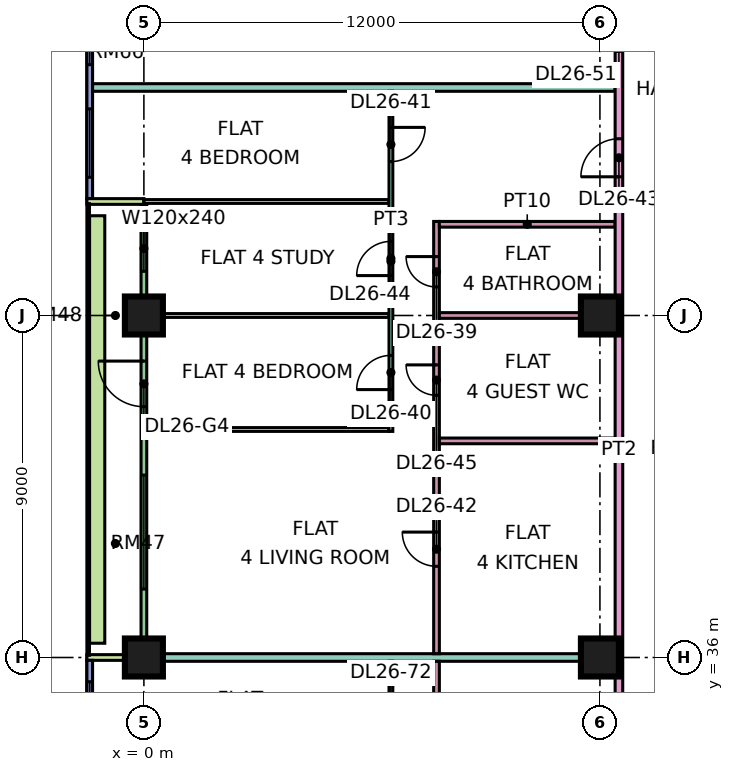
"""IFC4 building model, lengths in metres.
Left out: names, types, materials, properties, quantities, classifications, styles, units other than length and angle.
Written with IfcOpenShell. Run it as: python <this file> out.ifc"""

import sys

from ifc_helpers import new_model, si_unit, direction, frame, frame_2d, origin, origin_2d, place, context, subcontext, project, spatial, rectangle, extrude, element, fill, save


model = new_model("IFC4")
c1 = context("Model", 3, precision=1e-05, world=origin(), true_north=direction((0.0, 1.0)))
c2 = subcontext(c1, "Body", "Model", "MODEL_VIEW")
j1 = project(units=[si_unit("LENGTHUNIT", "METRE"), si_unit("PLANEANGLEUNIT", "RADIAN")], contexts=[c1])
p1 = place(None, origin())
s1 = spatial("IfcSite", under=j1, at=p1, CompositionType="ELEMENT")
p2 = place(p1, origin())
s2 = spatial("IfcBuilding", under=s1, at=p2, CompositionType="ELEMENT")
p3 = place(p2, frame((0.0, 0.0, 114.4)))
s3 = spatial("IfcBuildingStorey", under=s2, at=p3, CompositionType="ELEMENT", Elevation=114.4)
p4 = place(p3, frame((0.0, 36.0, 0.0), z_axis=(0.0, 0.0, 1.0), x_axis=(1.0, 0.0, 0.0)))
e1 = element("IfcColumn", 1, at=p4, inside=s3, PredefinedType="COLUMN", context=c2, shape_type="SweptSolid", body=[
    extrude(rectangle(XDim=1.0, YDim=1.0, at=origin_2d()), origin(), (0.0, 0.0, 1.0), 3.75),
])
for number, where, z_axis, x_axis in (
    (2, (0.0, 45.0, 0.0), (0.0, 0.0, 1.0), (1.0, 0.0, 0.0)),
    (3, (12.0, 36.0, 0.0), (0.0, 0.0, 1.0), (1.0, 0.0, 0.0)),
    (4, (12.0, 45.0, 0.0), (0.0, 0.0, 1.0), (1.0, 0.0, 0.0)),
):
    element("IfcColumn", number, at=place(p3, frame(where, z_axis=z_axis, x_axis=x_axis)), inside=s3, PredefinedType="COLUMN", context=c2, shape_type="SweptSolid", body=[
        extrude(rectangle(XDim=1.0, YDim=1.0, at=origin_2d()), origin(), (0.0, 0.0, 1.0), 3.75),
    ])
p5 = place(p3, frame((-1.425, 61.5, 0.0), z_axis=(0.0, 0.0, 1.0), x_axis=(0.0, -1.0, 0.0)))
e5 = element("IfcWall", 5, at=p5, inside=s3, PredefinedType="SOLIDWALL", context=c2, shape_type="SweptSolid", body=[
    extrude(rectangle(XDim=13.425, YDim=0.15, at=frame_2d((6.712, 0.0))), origin(), (0.0, 0.0, 1.0), 3.35),
])
p6 = place(p5, frame((0.75, 0.0, 0.45)))
e6 = element("IfcOpeningElement", 6, at=p6, cuts=e5, PredefinedType="OPENING", context=c2, shape_type="SweptSolid", body=[
    extrude(rectangle(XDim=3.0, YDim=2.4, at=frame_2d((1.5, 1.2))), frame((0.0, 0.085, 0.0), z_axis=(0.0, -1.0, 0.0), x_axis=(1.0, 0.0, 0.0)), (0.0, 0.0, 1.0), 0.17),
])
p7 = place(p5, frame((5.1, 0.0, 0.45)))
e7 = element("IfcOpeningElement", 7, at=p7, cuts=e5, PredefinedType="OPENING", context=c2, shape_type="SweptSolid", body=[
    extrude(rectangle(XDim=4.8, YDim=2.4, at=frame_2d((2.4, 1.2))), frame((0.0, 0.085, 0.0), z_axis=(0.0, -1.0, 0.0), x_axis=(1.0, 0.0, 0.0)), (0.0, 0.0, 1.0), 0.17),
])
p8 = place(p5, frame((11.062, 0.0, 0.45)))
e8 = element("IfcOpeningElement", 8, at=p8, cuts=e5, PredefinedType="OPENING", context=c2, shape_type="SweptSolid", body=[
    extrude(rectangle(XDim=1.8, YDim=2.4, at=frame_2d((0.9, 1.2))), frame((0.0, 0.085, 0.0), z_axis=(0.0, -1.0, 0.0), x_axis=(1.0, 0.0, 0.0)), (0.0, 0.0, 1.0), 0.17),
])
p9 = place(p3, frame((0.0, 47.925, 0.0), z_axis=(0.0, 0.0, 1.0), x_axis=(0.0, -1.0, 0.0)))
e9 = element("IfcWall", 9, at=p9, inside=s3, PredefinedType="SOLIDWALL", context=c2, shape_type="SweptSolid", body=[
    extrude(rectangle(XDim=11.85, YDim=0.15, at=frame_2d((5.925, 0.0))), origin(), (0.0, 0.0, 1.0), 3.35),
])
p10 = place(p9, frame((0.562, 0.0, 0.45)))
e10 = element("IfcOpeningElement", 10, at=p10, cuts=e9, PredefinedType="OPENING", context=c2, shape_type="SweptSolid", body=[
    extrude(rectangle(XDim=1.2, YDim=2.4, at=frame_2d((0.6, 1.2))), frame((0.0, 0.085, 0.0), z_axis=(0.0, -1.0, 0.0), x_axis=(1.0, 0.0, 0.0)), (0.0, 0.0, 1.0), 0.17),
])
p11 = place(p9, frame((4.125, 0.0, 0.0)))
e11 = element("IfcOpeningElement", 11, at=p11, cuts=e9, PredefinedType="OPENING", context=c2, shape_type="SweptSolid", body=[
    extrude(rectangle(XDim=1.2, YDim=2.4, at=frame_2d((0.6, 1.2))), frame((0.0, 0.085, 0.0), z_axis=(0.0, -1.0, 0.0), x_axis=(1.0, 0.0, 0.0)), (0.0, 0.0, 1.0), 0.17),
])
p12 = place(p9, frame((7.125, 0.0, 0.45)))
e12 = element("IfcOpeningElement", 12, at=p12, cuts=e9, PredefinedType="OPENING", context=c2, shape_type="SweptSolid", body=[
    extrude(rectangle(XDim=3.0, YDim=2.4, at=frame_2d((1.5, 1.2))), frame((0.0, 0.085, 0.0), z_axis=(0.0, -1.0, 0.0), x_axis=(1.0, 0.0, 0.0)), (0.0, 0.0, 1.0), 0.17),
])
for number, where, z_axis, x_axis in (
    (13, (-1.5, 48.0, 0.0), (0.0, 0.0, 1.0), (1.0, 0.0, 0.0)),
    (14, (-1.5, 36.0, 0.0), (0.0, 0.0, 1.0), (1.0, 0.0, 0.0)),
):
    element("IfcWall", number, at=place(p3, frame(where, z_axis=z_axis, x_axis=x_axis)), inside=s3, PredefinedType="SOLIDWALL", context=c2, shape_type="SweptSolid", body=[
        extrude(rectangle(XDim=1.5, YDim=0.15, at=frame_2d((0.75, 0.0))), origin(), (0.0, 0.0, 1.0), 3.35),
    ])
p13 = place(p3, frame((-1.425, 35.925, 0.0), z_axis=(0.0, 0.0, 1.0), x_axis=(0.0, -1.0, 0.0)))
e15 = element("IfcWall", 15, at=p13, inside=s3, PredefinedType="SOLIDWALL", context=c2, shape_type="SweptSolid", body=[
    extrude(rectangle(XDim=11.85, YDim=0.15, at=frame_2d((5.925, 0.0))), origin(), (0.0, 0.0, 1.0), 3.35),
])
p14 = place(p13, frame((0.562, 0.0, 0.45)))
e16 = element("IfcOpeningElement", 16, at=p14, cuts=e15, PredefinedType="OPENING", context=c2, shape_type="SweptSolid", body=[
    extrude(rectangle(XDim=1.8, YDim=2.4, at=frame_2d((0.9, 1.2))), frame((0.0, 0.085, 0.0), z_axis=(0.0, -1.0, 0.0), x_axis=(1.0, 0.0, 0.0)), (0.0, 0.0, 1.0), 0.17),
])
p15 = place(p13, frame((3.525, 0.0, 0.45)))
e17 = element("IfcOpeningElement", 17, at=p15, cuts=e15, PredefinedType="OPENING", context=c2, shape_type="SweptSolid", body=[
    extrude(rectangle(XDim=1.8, YDim=2.4, at=frame_2d((0.9, 1.2))), frame((0.0, 0.085, 0.0), z_axis=(0.0, -1.0, 0.0), x_axis=(1.0, 0.0, 0.0)), (0.0, 0.0, 1.0), 0.17),
])
p16 = place(p13, frame((7.387, 0.0, 0.45)))
e18 = element("IfcOpeningElement", 18, at=p16, cuts=e15, PredefinedType="OPENING", context=c2, shape_type="SweptSolid", body=[
    extrude(rectangle(XDim=3.0, YDim=2.4, at=frame_2d((1.5, 1.2))), frame((0.0, 0.085, 0.0), z_axis=(0.0, -1.0, 0.0), x_axis=(1.0, 0.0, 0.0)), (0.0, 0.0, 1.0), 0.17),
])
p17 = place(p3, frame((-1.229, 47.625, 0.0), z_axis=(0.0, 0.0, 1.0), x_axis=(0.0, -1.0, 0.0)))
e19 = element("IfcWall", 19, at=p17, inside=s3, PredefinedType="SOLIDWALL", context=c2, shape_type="SweptSolid", body=[
    extrude(rectangle(XDim=11.25, YDim=0.4, at=frame_2d((5.625, 0.0))), origin(), (0.0, 0.0, 1.0), 0.7),
])
e20 = element("IfcWall", 20, at=p4, inside=s3, PredefinedType="PARTITIONING", context=c2, shape_type="SweptSolid", body=[
    extrude(rectangle(XDim=12.4, YDim=0.2, at=frame_2d((6.2, 0.0))), origin(), (0.0, 0.0, 1.0), 3.35),
])
p18 = place(p3, frame((0.0, 48.0, 0.0), z_axis=(0.0, 0.0, 1.0), x_axis=(1.0, 0.0, 0.0)))
e21 = element("IfcWall", 21, at=p18, inside=s3, PredefinedType="PARTITIONING", context=c2, shape_type="SweptSolid", body=[
    extrude(rectangle(XDim=6.45, YDim=0.1, at=frame_2d((3.225, 0.0))), origin(), (0.0, 0.0, 1.0), 3.35),
])
p19 = place(p3, frame((-1.35, 51.0, 0.0), z_axis=(0.0, 0.0, 1.0), x_axis=(1.0, 0.0, 0.0)))
e22 = element("IfcWall", 22, at=p19, inside=s3, PredefinedType="PARTITIONING", context=c2, shape_type="SweptSolid", body=[
    extrude(rectangle(XDim=13.75, YDim=0.2, at=frame_2d((6.875, 0.0))), origin(), (0.0, 0.0, 1.0), 3.35),
])
for number, where, z_axis, x_axis in (
    (23, (0.074, 42.0, 0.0), (0.0, 0.0, 1.0), (1.0, 0.0, 0.0)),
    (24, (0.074, 45.0, 0.0), (0.0, 0.0, 1.0), (1.0, 0.0, 0.0)),
):
    element("IfcWall", number, at=place(p3, frame(where, z_axis=z_axis, x_axis=x_axis)), inside=s3, PredefinedType="PARTITIONING", context=c2, shape_type="SweptSolid", body=[
        extrude(rectangle(XDim=6.376, YDim=0.1, at=frame_2d((3.188, 0.0))), origin(), (0.0, 0.0, 1.0), 3.35),
    ])
p20 = place(p3, frame((6.5, 30.05, 0.0), z_axis=(0.0, 0.0, 1.0), x_axis=(0.0, 1.0, 0.0)))
e25 = element("IfcWall", 25, at=p20, inside=s3, PredefinedType="PARTITIONING", context=c2, shape_type="SweptSolid", body=[
    extrude(rectangle(XDim=5.85, YDim=0.1, at=frame_2d((2.925, 0.0))), origin(), (0.0, 0.0, 1.0), 3.35),
])
p21 = place(p20, frame((1.0, 0.0, 0.0)))
e26 = element("IfcOpeningElement", 26, at=p21, cuts=e25, PredefinedType="OPENING", context=c2, shape_type="SweptSolid", body=[
    extrude(rectangle(XDim=0.9, YDim=2.1, at=frame_2d((0.45, 1.05))), frame((0.0, 0.06, 0.0), z_axis=(0.0, -1.0, 0.0), x_axis=(1.0, 0.0, 0.0)), (0.0, 0.0, 1.0), 0.12),
])
p22 = place(p20, frame((4.0, 0.0, 0.0)))
e27 = element("IfcOpeningElement", 27, at=p22, cuts=e25, PredefinedType="OPENING", context=c2, shape_type="SweptSolid", body=[
    extrude(rectangle(XDim=0.9, YDim=2.1, at=frame_2d((0.45, 1.05))), frame((0.0, 0.06, 0.0), z_axis=(0.0, -1.0, 0.0), x_axis=(1.0, 0.0, 0.0)), (0.0, 0.0, 1.0), 0.12),
])
p23 = place(p3, frame((6.5, 41.95, 0.0), z_axis=(0.0, 0.0, 1.0), x_axis=(0.0, 1.0, 0.0)))
e28 = element("IfcWall", 28, at=p23, inside=s3, PredefinedType="PARTITIONING", context=c2, shape_type="SweptSolid", body=[
    extrude(rectangle(XDim=8.95, YDim=0.1, at=frame_2d((4.475, 0.0))), origin(), (0.0, 0.0, 1.0), 3.35),
])
p24 = place(p23, frame((1.1, 0.0, 0.0)))
e29 = element("IfcOpeningElement", 29, at=p24, cuts=e28, PredefinedType="OPENING", context=c2, shape_type="SweptSolid", body=[
    extrude(rectangle(XDim=0.9, YDim=2.1, at=frame_2d((0.45, 1.05))), frame((0.0, 0.06, 0.0), z_axis=(0.0, -1.0, 0.0), x_axis=(1.0, 0.0, 0.0)), (0.0, 0.0, 1.0), 0.12),
])
p25 = place(p23, frame((7.1, 0.0, 0.0)))
e30 = element("IfcOpeningElement", 30, at=p25, cuts=e28, PredefinedType="OPENING", context=c2, shape_type="SweptSolid", body=[
    extrude(rectangle(XDim=0.9, YDim=2.1, at=frame_2d((0.45, 1.05))), frame((0.0, 0.06, 0.0), z_axis=(0.0, -1.0, 0.0), x_axis=(1.0, 0.0, 0.0)), (0.0, 0.0, 1.0), 0.12),
])
p26 = place(p23, frame((4.1, 0.0, 0.0)))
e31 = element("IfcOpeningElement", 31, at=p26, cuts=e28, PredefinedType="OPENING", context=c2, shape_type="SweptSolid", body=[
    extrude(rectangle(XDim=0.9, YDim=2.1, at=frame_2d((0.45, 1.05))), frame((0.0, 0.06, 0.0), z_axis=(0.0, -1.0, 0.0), x_axis=(1.0, 0.0, 0.0)), (0.0, 0.0, 1.0), 0.12),
])
p27 = place(p3, frame((7.7, 26.625, 0.0), z_axis=(0.0, 0.0, 1.0), x_axis=(0.0, 1.0, 0.0)))
e32 = element("IfcWall", 32, at=p27, inside=s3, PredefinedType="PARTITIONING", context=c2, shape_type="SweptSolid", body=[
    extrude(rectangle(XDim=9.275, YDim=0.15, at=frame_2d((4.637, 0.0))), origin(), (0.0, 0.0, 1.0), 3.35),
])
p28 = place(p27, frame((1.275, 0.0, 0.0)))
e33 = element("IfcOpeningElement", 33, at=p28, cuts=e32, PredefinedType="OPENING", context=c2, shape_type="SweptSolid", body=[
    extrude(rectangle(XDim=0.8, YDim=2.1, at=frame_2d((0.4, 1.05))), frame((0.0, 0.085, 0.0), z_axis=(0.0, -1.0, 0.0), x_axis=(1.0, 0.0, 0.0)), (0.0, 0.0, 1.0), 0.17),
])
p29 = place(p27, frame((5.925, 0.0, 0.0)))
e34 = element("IfcOpeningElement", 34, at=p29, cuts=e32, PredefinedType="OPENING", context=c2, shape_type="SweptSolid", body=[
    extrude(rectangle(XDim=0.9, YDim=2.1, at=frame_2d((0.45, 1.05))), frame((0.0, 0.085, 0.0), z_axis=(0.0, -1.0, 0.0), x_axis=(1.0, 0.0, 0.0)), (0.0, 0.0, 1.0), 0.17),
])
p30 = place(p3, frame((7.7, 36.1, 0.0), z_axis=(0.0, 0.0, 1.0), x_axis=(0.0, 1.0, 0.0)))
e35 = element("IfcWall", 35, at=p30, inside=s3, PredefinedType="PARTITIONING", context=c2, shape_type="SweptSolid", body=[
    extrude(rectangle(XDim=11.375, YDim=0.15, at=frame_2d((5.688, 0.0))), origin(), (0.0, 0.0, 1.0), 3.35),
])
p31 = place(p30, frame((9.65, 0.0, 0.0)))
e36 = element("IfcOpeningElement", 36, at=p31, cuts=e35, PredefinedType="OPENING", context=c2, shape_type="SweptSolid", body=[
    extrude(rectangle(XDim=0.8, YDim=2.1, at=frame_2d((0.4, 1.05))), frame((0.0, 0.085, 0.0), z_axis=(0.0, -1.0, 0.0), x_axis=(1.0, 0.0, 0.0)), (0.0, 0.0, 1.0), 0.17),
])
p32 = place(p30, frame((2.3, 0.0, 0.0)))
e37 = element("IfcOpeningElement", 37, at=p32, cuts=e35, PredefinedType="OPENING", context=c2, shape_type="SweptSolid", body=[
    extrude(rectangle(XDim=0.9, YDim=2.1, at=frame_2d((0.45, 1.05))), frame((0.0, 0.085, 0.0), z_axis=(0.0, -1.0, 0.0), x_axis=(1.0, 0.0, 0.0)), (0.0, 0.0, 1.0), 0.17),
])
p33 = place(p30, frame((6.8, 0.0, 0.0)))
e38 = element("IfcOpeningElement", 38, at=p33, cuts=e35, PredefinedType="OPENING", context=c2, shape_type="SweptSolid", body=[
    extrude(rectangle(XDim=0.8, YDim=2.1, at=frame_2d((0.4, 1.05))), frame((0.0, 0.085, 0.0), z_axis=(0.0, -1.0, 0.0), x_axis=(1.0, 0.0, 0.0)), (0.0, 0.0, 1.0), 0.17),
])
for number, where, z_axis, x_axis in (
    (39, (7.775, 41.7, 0.0), (0.0, 0.0, 1.0), (1.0, 0.0, 0.0)),
    (40, (7.775, 45.0, 0.0), (0.0, 0.0, 1.0), (1.0, 0.0, 0.0)),
    (41, (7.775, 47.4, 0.0), (0.0, 0.0, 1.0), (1.0, 0.0, 0.0)),
):
    element("IfcWall", number, at=place(p3, frame(where, z_axis=z_axis, x_axis=x_axis)), inside=s3, PredefinedType="PARTITIONING", context=c2, shape_type="SweptSolid", body=[
        extrude(rectangle(XDim=4.625, YDim=0.15, at=frame_2d((2.312, 0.0))), origin(), (0.0, 0.0, 1.0), 3.35),
    ])
p34 = place(p3, frame((12.5, 20.0, 0.0), z_axis=(0.0, 0.0, 1.0), x_axis=(0.0, 1.0, 0.0)))
e42 = element("IfcWall", 42, at=p34, inside=s3, PredefinedType="PARTITIONING", context=c2, shape_type="SweptSolid", body=[
    extrude(rectangle(XDim=42.926, YDim=0.2, at=frame_2d((21.463, 0.0))), origin(), (0.0, 0.0, 1.0), 3.35),
])
p35 = place(p34, frame((28.65, 0.0, 0.0)))
e43 = element("IfcOpeningElement", 43, at=p35, cuts=e42, PredefinedType="OPENING", context=c2, shape_type="SweptSolid", body=[
    extrude(rectangle(XDim=1.0, YDim=2.1, at=frame_2d((0.5, 1.05))), frame((0.0, 0.11, 0.0), z_axis=(0.0, -1.0, 0.0), x_axis=(1.0, 0.0, 0.0)), (0.0, 0.0, 1.0), 0.22),
])
p36 = place(p34, frame((31.95, 0.0, 0.0)))
e44 = element("IfcOpeningElement", 44, at=p36, cuts=e42, PredefinedType="OPENING", context=c2, shape_type="SweptSolid", body=[
    extrude(rectangle(XDim=1.0, YDim=2.1, at=frame_2d((0.5, 1.05))), frame((0.0, 0.11, 0.0), z_axis=(0.0, -1.0, 0.0), x_axis=(1.0, 0.0, 0.0)), (0.0, 0.0, 1.0), 0.22),
])
p37 = place(p34, frame((0.6, 0.0, 0.0)))
e45 = element("IfcOpeningElement", 45, at=p37, cuts=e42, PredefinedType="OPENING", context=c2, shape_type="SweptSolid", body=[
    extrude(rectangle(XDim=1.2, YDim=2.1, at=frame_2d((0.6, 1.05))), frame((0.0, 0.11, 0.0), z_axis=(0.0, -1.0, 0.0), x_axis=(1.0, 0.0, 0.0)), (0.0, 0.0, 1.0), 0.22),
])
p38 = place(p34, frame((4.65, 0.0, 0.0)))
e46 = element("IfcOpeningElement", 46, at=p38, cuts=e42, PredefinedType="OPENING", context=c2, shape_type="SweptSolid", body=[
    extrude(rectangle(XDim=1.0, YDim=2.1, at=frame_2d((0.5, 1.05))), frame((0.0, 0.11, 0.0), z_axis=(0.0, -1.0, 0.0), x_axis=(1.0, 0.0, 0.0)), (0.0, 0.0, 1.0), 0.22),
])
p39 = place(p7, origin())
e47 = element("IfcWindow", 47, at=p39, inside=s3, PartitioningType="SINGLE_PANEL", PredefinedType="WINDOW", context=c2, shape_type="SweptSolid", body=[
    extrude(rectangle(XDim=4.8, YDim=2.4, at=frame_2d((2.4, 1.2))), frame((0.0, 0.03, 0.0), z_axis=(0.0, -1.0, 0.0), x_axis=(1.0, 0.0, 0.0)), (0.0, 0.0, 1.0), 0.06),
])
fill(e7, e47)
p40 = place(p8, origin())
e48 = element("IfcWindow", 48, at=p40, inside=s3, PartitioningType="SINGLE_PANEL", PredefinedType="WINDOW", context=c2, shape_type="SweptSolid", body=[
    extrude(rectangle(XDim=1.8, YDim=2.4, at=frame_2d((0.9, 1.2))), frame((0.0, 0.03, 0.0), z_axis=(0.0, -1.0, 0.0), x_axis=(1.0, 0.0, 0.0)), (0.0, 0.0, 1.0), 0.06),
])
fill(e8, e48)
p41 = place(p10, origin())
e49 = element("IfcWindow", 49, at=p41, inside=s3, PartitioningType="SINGLE_PANEL", PredefinedType="WINDOW", context=c2, shape_type="SweptSolid", body=[
    extrude(rectangle(XDim=1.2, YDim=2.4, at=frame_2d((0.6, 1.2))), frame((0.0, 0.03, 0.0), z_axis=(0.0, -1.0, 0.0), x_axis=(1.0, 0.0, 0.0)), (0.0, 0.0, 1.0), 0.06),
])
fill(e10, e49)
p42 = place(p11, frame((1.2, 0.0, 0.0), z_axis=(0.0, 0.0, 1.0), x_axis=(-1.0, 0.0, 0.0)))
e50 = element("IfcDoor", 50, at=p42, inside=s3, OperationType="DOUBLE_DOOR_SINGLE_SWING", PredefinedType="DOOR", context=c2, shape_type="SweptSolid", body=[
    extrude(rectangle(XDim=1.2, YDim=2.4, at=frame_2d((0.6, 1.2))), frame((0.0, 0.025, 0.0), z_axis=(0.0, -1.0, 0.0), x_axis=(1.0, 0.0, 0.0)), (0.0, 0.0, 1.0), 0.05),
])
fill(e11, e50)
p43 = place(p12, origin())
e51 = element("IfcWindow", 51, at=p43, inside=s3, PartitioningType="SINGLE_PANEL", PredefinedType="WINDOW", context=c2, shape_type="SweptSolid", body=[
    extrude(rectangle(XDim=3.0, YDim=2.4, at=frame_2d((1.5, 1.2))), frame((0.0, 0.03, 0.0), z_axis=(0.0, -1.0, 0.0), x_axis=(1.0, 0.0, 0.0)), (0.0, 0.0, 1.0), 0.06),
])
fill(e12, e51)
p44 = place(p14, origin())
e52 = element("IfcWindow", 52, at=p44, inside=s3, PartitioningType="SINGLE_PANEL", PredefinedType="WINDOW", context=c2, shape_type="SweptSolid", body=[
    extrude(rectangle(XDim=1.8, YDim=2.4, at=frame_2d((0.9, 1.2))), frame((0.0, 0.03, 0.0), z_axis=(0.0, -1.0, 0.0), x_axis=(1.0, 0.0, 0.0)), (0.0, 0.0, 1.0), 0.06),
])
fill(e16, e52)
p45 = place(p31, frame((0.8, 0.0, 0.0), z_axis=(0.0, 0.0, 1.0), x_axis=(-1.0, 0.0, 0.0)))
e53 = element("IfcDoor", 53, at=p45, inside=s3, OperationType="SINGLE_SWING_RIGHT", PredefinedType="DOOR", context=c2, shape_type="SweptSolid", body=[
    extrude(rectangle(XDim=0.8, YDim=2.1, at=frame_2d((0.4, 1.05))), frame((0.0, 0.025, 0.0), z_axis=(0.0, -1.0, 0.0), x_axis=(1.0, 0.0, 0.0)), (0.0, 0.0, 1.0), 0.05),
])
fill(e36, e53)
p46 = place(p24, origin())
e54 = element("IfcDoor", 54, at=p46, inside=s3, OperationType="SINGLE_SWING_LEFT", PredefinedType="DOOR", context=c2, shape_type="SweptSolid", body=[
    extrude(rectangle(XDim=0.9, YDim=2.1, at=frame_2d((0.45, 1.05))), frame((0.0, 0.025, 0.0), z_axis=(0.0, -1.0, 0.0), x_axis=(1.0, 0.0, 0.0)), (0.0, 0.0, 1.0), 0.05),
])
fill(e29, e54)
p47 = place(p25, origin())
e55 = element("IfcDoor", 55, at=p47, inside=s3, OperationType="SINGLE_SWING_RIGHT", PredefinedType="DOOR", context=c2, shape_type="SweptSolid", body=[
    extrude(rectangle(XDim=0.9, YDim=2.1, at=frame_2d((0.45, 1.05))), frame((0.0, 0.025, 0.0), z_axis=(0.0, -1.0, 0.0), x_axis=(1.0, 0.0, 0.0)), (0.0, 0.0, 1.0), 0.05),
])
fill(e30, e55)
p48 = place(p32, frame((0.9, 0.0, 0.0), z_axis=(0.0, 0.0, 1.0), x_axis=(-1.0, 0.0, 0.0)))
e56 = element("IfcDoor", 56, at=p48, inside=s3, OperationType="SINGLE_SWING_RIGHT", PredefinedType="DOOR", context=c2, shape_type="SweptSolid", body=[
    extrude(rectangle(XDim=0.9, YDim=2.1, at=frame_2d((0.45, 1.05))), frame((0.0, 0.025, 0.0), z_axis=(0.0, -1.0, 0.0), x_axis=(1.0, 0.0, 0.0)), (0.0, 0.0, 1.0), 0.05),
])
fill(e37, e56)
p49 = place(p35, origin())
e57 = element("IfcDoor", 57, at=p49, inside=s3, OperationType="SINGLE_SWING_LEFT", PredefinedType="DOOR", context=c2, shape_type="SweptSolid", body=[
    extrude(rectangle(XDim=1.0, YDim=2.1, at=frame_2d((0.5, 1.05))), frame((0.0, 0.025, 0.0), z_axis=(0.0, -1.0, 0.0), x_axis=(1.0, 0.0, 0.0)), (0.0, 0.0, 1.0), 0.05),
])
fill(e43, e57)
p50 = place(p26, origin())
e58 = element("IfcDoor", 58, at=p50, inside=s3, OperationType="SINGLE_SWING_LEFT", PredefinedType="DOOR", context=c2, shape_type="SweptSolid", body=[
    extrude(rectangle(XDim=0.9, YDim=2.1, at=frame_2d((0.45, 1.05))), frame((0.0, 0.025, 0.0), z_axis=(0.0, -1.0, 0.0), x_axis=(1.0, 0.0, 0.0)), (0.0, 0.0, 1.0), 0.05),
])
fill(e31, e58)
p51 = place(p33, frame((0.8, 0.0, 0.0), z_axis=(0.0, 0.0, 1.0), x_axis=(-1.0, 0.0, 0.0)))
e59 = element("IfcDoor", 59, at=p51, inside=s3, OperationType="SINGLE_SWING_RIGHT", PredefinedType="DOOR", context=c2, shape_type="SweptSolid", body=[
    extrude(rectangle(XDim=0.8, YDim=2.1, at=frame_2d((0.4, 1.05))), frame((0.0, 0.025, 0.0), z_axis=(0.0, -1.0, 0.0), x_axis=(1.0, 0.0, 0.0)), (0.0, 0.0, 1.0), 0.05),
])
fill(e38, e59)
save(model, sys.argv[1])
